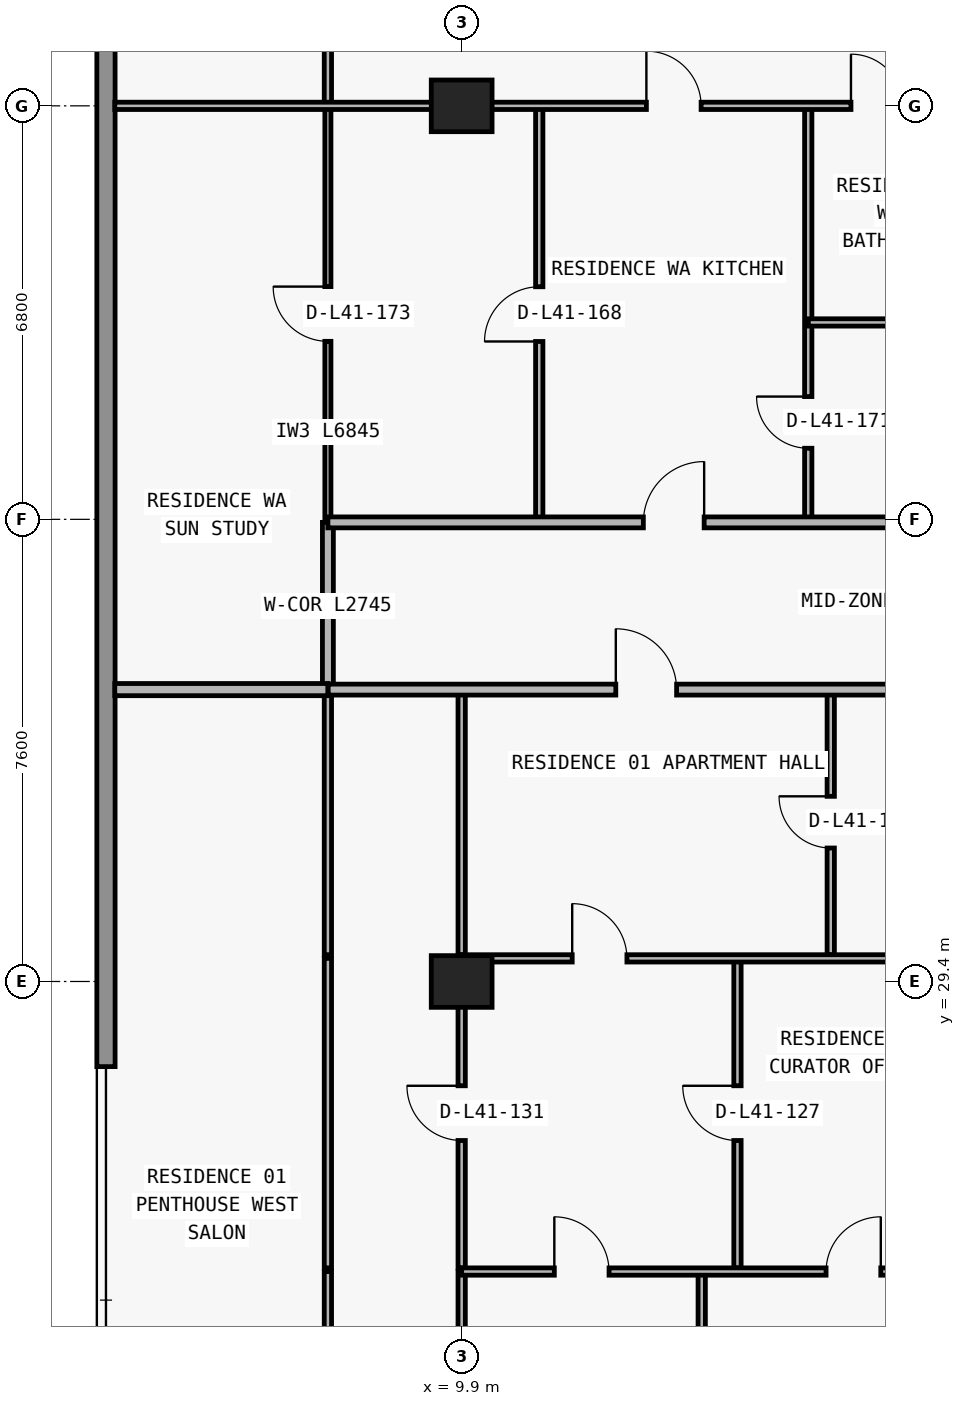
"""IFC4 building model, lengths in metres.
Left out: names, types, materials, properties, quantities, classifications, styles, units other than length and angle.
Written with IfcOpenShell. Run it as: python <this file> out.ifc"""

import sys

from ifc_helpers import new_model, si_unit, direction, frame, frame_2d, origin, origin_2d, place, context, subcontext, project, spatial, rectangle, extrude, element, fill, save


model = new_model("IFC4")
c1 = context("Model", 3, precision=1e-05, world=origin(), true_north=direction((0.0, 1.0)))
c2 = subcontext(c1, "Body", "Model", "MODEL_VIEW")
j1 = project(units=[si_unit("LENGTHUNIT", "METRE"), si_unit("PLANEANGLEUNIT", "RADIAN")], contexts=[c1])
p1 = place(None, origin())
s1 = spatial("IfcSite", under=j1, at=p1, CompositionType="ELEMENT")
p2 = place(p1, origin())
s2 = spatial("IfcBuilding", under=s1, at=p2, CompositionType="ELEMENT")
p3 = place(p2, frame((0.0, 0.0, 148.8)))
s3 = spatial("IfcBuildingStorey", under=s2, at=p3, CompositionType="ELEMENT", Elevation=148.8)
for number, where, z_axis, x_axis in (
    (1, (9.9, 29.4, 0.0), (0.0, 0.0, 1.0), (1.0, 0.0, 0.0)),
    (2, (9.9, 43.8, 0.0), (0.0, 0.0, 1.0), (1.0, 0.0, 0.0)),
):
    element("IfcColumn", number, at=place(p3, frame(where, z_axis=z_axis, x_axis=x_axis)), inside=s3, PredefinedType="COLUMN", context=c2, shape_type="SweptSolid", body=[
        extrude(rectangle(XDim=1.0, YDim=0.85, at=origin_2d()), origin(), (0.0, 0.0, 1.0), 3.0),
    ])
p4 = place(p3, frame((4.05, 28.0, 0.0), z_axis=(0.0, 0.0, 1.0), x_axis=(0.0, 1.0, 0.0)))
e3 = element("IfcWall", 3, at=p4, inside=s3, PredefinedType="STANDARD", context=c2, shape_type="SweptSolid", body=[
    extrude(rectangle(XDim=19.2, YDim=0.3, at=frame_2d((9.6, 0.0))), origin(), (0.0, 0.0, 1.0), 3.0),
])
p5 = place(p3, frame((7.7, 8.885, 0.0), z_axis=(0.0, 0.0, 1.0), x_axis=(0.0, 1.0, 0.0)))
e4 = element("IfcWall", 4, at=p5, inside=s3, PredefinedType="PARTITIONING", context=c2, shape_type="SweptSolid", body=[
    extrude(rectangle(XDim=15.745, YDim=0.12, at=frame_2d((7.873, 0.0))), origin(), (0.0, 0.0, 1.0), 3.0),
])
p6 = place(p5, frame((7.423, 0.0, 0.0)))
e5 = element("IfcOpeningElement", 5, at=p6, cuts=e4, PredefinedType="OPENING", context=c2, shape_type="SweptSolid", body=[
    extrude(rectangle(XDim=0.9, YDim=2.15, at=frame_2d((0.45, 1.075))), frame((0.0, 0.07, 0.0), z_axis=(0.0, -1.0, 0.0), x_axis=(1.0, 0.0, 0.0)), (0.0, 0.0, 1.0), 0.14),
])
p7 = place(p3, frame((7.7, 24.69, 0.0), z_axis=(0.0, 0.0, 1.0), x_axis=(0.0, 1.0, 0.0)))
e6 = element("IfcWall", 6, at=p7, inside=s3, PredefinedType="PARTITIONING", context=c2, shape_type="SweptSolid", body=[
    extrude(rectangle(XDim=5.09, YDim=0.12, at=frame_2d((2.545, 0.0))), origin(), (0.0, 0.0, 1.0), 3.0),
])
p8 = place(p3, frame((7.7, 29.84, 0.0), z_axis=(0.0, 0.0, 1.0), x_axis=(0.0, 1.0, 0.0)))
e7 = element("IfcWall", 7, at=p8, inside=s3, PredefinedType="PARTITIONING", context=c2, shape_type="SweptSolid", body=[
    extrude(rectangle(XDim=4.36, YDim=0.12, at=frame_2d((2.18, 0.0))), origin(), (0.0, 0.0, 1.0), 3.0),
])
p9 = place(p3, frame((7.7, 34.205, 0.0), z_axis=(0.0, 0.0, 1.0), x_axis=(0.0, 1.0, 0.0)))
e8 = element("IfcWall", 8, at=p9, inside=s3, PredefinedType="PARTITIONING", context=c2, shape_type="SweptSolid", body=[
    extrude(rectangle(XDim=2.745, YDim=0.18, at=frame_2d((1.373, 0.0))), origin(), (0.0, 0.0, 1.0), 3.0),
])
p10 = place(p3, frame((7.7, 36.955, 0.0), z_axis=(0.0, 0.0, 1.0), x_axis=(0.0, 1.0, 0.0)))
e9 = element("IfcWall", 9, at=p10, inside=s3, PredefinedType="MOVABLE", context=c2, shape_type="SweptSolid", body=[
    extrude(rectangle(XDim=6.845, YDim=0.1, at=frame_2d((3.422, 0.0))), origin(), (0.0, 0.0, 1.0), 3.0),
])
p11 = place(p10, frame((2.972, 0.0, 0.0)))
e10 = element("IfcOpeningElement", 10, at=p11, cuts=e9, PredefinedType="OPENING", context=c2, shape_type="SweptSolid", body=[
    extrude(rectangle(XDim=0.9, YDim=2.15, at=frame_2d((0.45, 1.075))), frame((0.0, 0.06, 0.0), z_axis=(0.0, -1.0, 0.0), x_axis=(1.0, 0.0, 0.0)), (0.0, 0.0, 1.0), 0.12),
])
p12 = place(p3, frame((7.7, 43.805, 0.0), z_axis=(0.0, 0.0, 1.0), x_axis=(0.0, 1.0, 0.0)))
e11 = element("IfcWall", 11, at=p12, inside=s3, PredefinedType="PARTITIONING", context=c2, shape_type="SweptSolid", body=[
    extrude(rectangle(XDim=3.275, YDim=0.12, at=frame_2d((1.638, 0.0))), origin(), (0.0, 0.0, 1.0), 3.0),
])
p13 = place(p12, frame((1.188, 0.0, 0.0)))
e12 = element("IfcOpeningElement", 12, at=p13, cuts=e11, PredefinedType="OPENING", context=c2, shape_type="SweptSolid", body=[
    extrude(rectangle(XDim=0.9, YDim=2.15, at=frame_2d((0.45, 1.075))), frame((0.0, 0.07, 0.0), z_axis=(0.0, -1.0, 0.0), x_axis=(1.0, 0.0, 0.0)), (0.0, 0.0, 1.0), 0.14),
])
p14 = place(p3, frame((9.9, 8.84, 0.0), z_axis=(0.0, 0.0, 1.0), x_axis=(0.0, 1.0, 0.0)))
e13 = element("IfcWall", 13, at=p14, inside=s3, PredefinedType="PARTITIONING", context=c2, shape_type="SweptSolid", body=[
    extrude(rectangle(XDim=15.79, YDim=0.12, at=frame_2d((7.895, 0.0))), origin(), (0.0, 0.0, 1.0), 2.124),
])
p15 = place(p3, frame((9.9, 24.69, 0.0), z_axis=(0.0, 0.0, 1.0), x_axis=(0.0, 1.0, 0.0)))
e14 = element("IfcWall", 14, at=p15, inside=s3, PredefinedType="PARTITIONING", context=c2, shape_type="SweptSolid", body=[
    extrude(rectangle(XDim=5.09, YDim=0.12, at=frame_2d((2.545, 0.0))), origin(), (0.0, 0.0, 1.0), 2.124),
])
p16 = place(p15, frame((2.095, 0.0, 0.0)))
e15 = element("IfcOpeningElement", 15, at=p16, cuts=e14, PredefinedType="OPENING", context=c2, shape_type="SweptSolid", body=[
    extrude(rectangle(XDim=0.9, YDim=2.074, at=frame_2d((0.45, 1.037))), frame((0.0, 0.07, 0.0), z_axis=(0.0, -1.0, 0.0), x_axis=(1.0, 0.0, 0.0)), (0.0, 0.0, 1.0), 0.14),
])
p17 = place(p3, frame((9.9, 29.84, 0.0), z_axis=(0.0, 0.0, 1.0), x_axis=(0.0, 1.0, 0.0)))
e16 = element("IfcWall", 16, at=p17, inside=s3, PredefinedType="PARTITIONING", context=c2, shape_type="SweptSolid", body=[
    extrude(rectangle(XDim=4.36, YDim=0.12, at=frame_2d((2.18, 0.0))), origin(), (0.0, 0.0, 1.0), 2.124),
])
p18 = place(p3, frame((11.176, 36.95, 0.0), z_axis=(0.0, 0.0, 1.0), x_axis=(0.0, 1.0, 0.0)))
e17 = element("IfcWall", 17, at=p18, inside=s3, PredefinedType="PARTITIONING", context=c2, shape_type="SweptSolid", body=[
    extrude(rectangle(XDim=6.85, YDim=0.12, at=frame_2d((3.425, 0.0))), origin(), (0.0, 0.0, 1.0), 3.0),
])
p19 = place(p18, frame((2.975, 0.0, 0.0)))
e18 = element("IfcOpeningElement", 18, at=p19, cuts=e17, PredefinedType="OPENING", context=c2, shape_type="SweptSolid", body=[
    extrude(rectangle(XDim=0.9, YDim=2.15, at=frame_2d((0.45, 1.075))), frame((0.0, 0.07, 0.0), z_axis=(0.0, -1.0, 0.0), x_axis=(1.0, 0.0, 0.0)), (0.0, 0.0, 1.0), 0.14),
])
p20 = place(p3, frame((13.848, 8.84, 0.0), z_axis=(0.0, 0.0, 1.0), x_axis=(0.0, 1.0, 0.0)))
e19 = element("IfcWall", 19, at=p20, inside=s3, PredefinedType="PARTITIONING", context=c2, shape_type="SweptSolid", body=[
    extrude(rectangle(XDim=15.79, YDim=0.12, at=frame_2d((7.895, 0.0))), origin(), (0.0, 0.0, 1.0), 3.0),
])
p21 = place(p3, frame((14.436, 24.69, 0.0), z_axis=(0.0, 0.0, 1.0), x_axis=(0.0, 1.0, 0.0)))
e20 = element("IfcWall", 20, at=p21, inside=s3, PredefinedType="PARTITIONING", context=c2, shape_type="SweptSolid", body=[
    extrude(rectangle(XDim=5.09, YDim=0.12, at=frame_2d((2.545, 0.0))), origin(), (0.0, 0.0, 1.0), 3.0),
])
p22 = place(p21, frame((2.095, 0.0, 0.0)))
e21 = element("IfcOpeningElement", 21, at=p22, cuts=e20, PredefinedType="OPENING", context=c2, shape_type="SweptSolid", body=[
    extrude(rectangle(XDim=0.9, YDim=2.15, at=frame_2d((0.45, 1.075))), frame((0.0, 0.07, 0.0), z_axis=(0.0, -1.0, 0.0), x_axis=(1.0, 0.0, 0.0)), (0.0, 0.0, 1.0), 0.14),
])
p23 = place(p3, frame((15.6, 36.95, 0.0), z_axis=(0.0, 0.0, 1.0), x_axis=(0.0, 1.0, 0.0)))
e22 = element("IfcWall", 22, at=p23, inside=s3, PredefinedType="PARTITIONING", context=c2, shape_type="SweptSolid", body=[
    extrude(rectangle(XDim=6.85, YDim=0.12, at=frame_2d((3.425, 0.0))), origin(), (0.0, 0.0, 1.0), 3.0),
])
p24 = place(p23, frame((1.219, 0.0, 0.0)))
e23 = element("IfcOpeningElement", 23, at=p24, cuts=e22, PredefinedType="OPENING", context=c2, shape_type="SweptSolid", body=[
    extrude(rectangle(XDim=0.85, YDim=2.1, at=frame_2d((0.425, 1.05))), frame((0.0, 0.07, 0.0), z_axis=(0.0, -1.0, 0.0), x_axis=(1.0, 0.0, 0.0)), (0.0, 0.0, 1.0), 0.14),
])
p25 = place(p3, frame((15.97, 29.84, 0.0), z_axis=(0.0, 0.0, 1.0), x_axis=(0.0, 1.0, 0.0)))
e24 = element("IfcWall", 24, at=p25, inside=s3, PredefinedType="PARTITIONING", context=c2, shape_type="SweptSolid", body=[
    extrude(rectangle(XDim=4.36, YDim=0.12, at=frame_2d((2.18, 0.0))), origin(), (0.0, 0.0, 1.0), 3.0),
])
p26 = place(p25, frame((1.755, 0.0, 0.0)))
e25 = element("IfcOpeningElement", 25, at=p26, cuts=e24, PredefinedType="OPENING", context=c2, shape_type="SweptSolid", body=[
    extrude(rectangle(XDim=0.85, YDim=2.1, at=frame_2d((0.425, 1.05))), frame((0.0, 0.07, 0.0), z_axis=(0.0, -1.0, 0.0), x_axis=(1.0, 0.0, 0.0)), (0.0, 0.0, 1.0), 0.14),
])
p27 = place(p3, frame((9.9, 24.63, 0.0), z_axis=(0.0, 0.0, 1.0), x_axis=(1.0, 0.0, 0.0)))
e26 = element("IfcWall", 26, at=p27, inside=s3, PredefinedType="PARTITIONING", context=c2, shape_type="SweptSolid", body=[
    extrude(rectangle(XDim=8.35, YDim=0.12, at=frame_2d((4.175, 0.0))), origin(), (0.0, 0.0, 1.0), 3.0),
])
p28 = place(p27, frame((1.524, 0.0, 0.0)))
e27 = element("IfcOpeningElement", 27, at=p28, cuts=e26, PredefinedType="OPENING", context=c2, shape_type="SweptSolid", body=[
    extrude(rectangle(XDim=0.9, YDim=2.15, at=frame_2d((0.45, 1.075))), frame((0.0, 0.07, 0.0), z_axis=(0.0, -1.0, 0.0), x_axis=(1.0, 0.0, 0.0)), (0.0, 0.0, 1.0), 0.14),
])
p29 = place(p27, frame((5.993, 0.0, 0.0)))
e28 = element("IfcOpeningElement", 28, at=p29, cuts=e26, PredefinedType="OPENING", context=c2, shape_type="SweptSolid", body=[
    extrude(rectangle(XDim=0.9, YDim=2.15, at=frame_2d((0.45, 1.075))), frame((0.0, 0.07, 0.0), z_axis=(0.0, -1.0, 0.0), x_axis=(1.0, 0.0, 0.0)), (0.0, 0.0, 1.0), 0.14),
])
p30 = place(p3, frame((9.9, 29.78, 0.0), z_axis=(0.0, 0.0, 1.0), x_axis=(1.0, 0.0, 0.0)))
e29 = element("IfcWall", 29, at=p30, inside=s3, PredefinedType="PARTITIONING", context=c2, shape_type="SweptSolid", body=[
    extrude(rectangle(XDim=8.35, YDim=0.12, at=frame_2d((4.175, 0.0))), origin(), (0.0, 0.0, 1.0), 3.0),
])
p31 = place(p30, frame((1.818, 0.0, 0.0)))
e30 = element("IfcOpeningElement", 30, at=p31, cuts=e29, PredefinedType="OPENING", context=c2, shape_type="SweptSolid", body=[
    extrude(rectangle(XDim=0.9, YDim=2.15, at=frame_2d((0.45, 1.075))), frame((0.0, 0.07, 0.0), z_axis=(0.0, -1.0, 0.0), x_axis=(1.0, 0.0, 0.0)), (0.0, 0.0, 1.0), 0.14),
])
p32 = place(p3, frame((4.195, 34.2, 0.0), z_axis=(0.0, 0.0, 1.0), x_axis=(1.0, 0.0, 0.0)))
e31 = element("IfcWall", 31, at=p32, inside=s3, PredefinedType="PARTITIONING", context=c2, shape_type="SweptSolid", body=[
    extrude(rectangle(XDim=3.505, YDim=0.2, at=frame_2d((1.752, 0.0))), origin(), (0.0, 0.0, 1.0), 3.0),
])
p33 = place(p3, frame((7.705, 34.2, 0.0), z_axis=(0.0, 0.0, 1.0), x_axis=(1.0, 0.0, 0.0)))
e32 = element("IfcWall", 32, at=p33, inside=s3, PredefinedType="PARTITIONING", context=c2, shape_type="SweptSolid", body=[
    extrude(rectangle(XDim=10.545, YDim=0.18, at=frame_2d((5.272, 0.0))), origin(), (0.0, 0.0, 1.0), 3.0),
])
p34 = place(p33, frame((4.73, 0.0, 0.0)))
e33 = element("IfcOpeningElement", 33, at=p34, cuts=e32, PredefinedType="OPENING", context=c2, shape_type="SweptSolid", body=[
    extrude(rectangle(XDim=1.0, YDim=2.2, at=frame_2d((0.5, 1.1))), frame((0.0, 0.1, 0.0), z_axis=(0.0, -1.0, 0.0), x_axis=(1.0, 0.0, 0.0)), (0.0, 0.0, 1.0), 0.2),
])
p35 = place(p3, frame((7.7, 36.95, 0.0), z_axis=(0.0, 0.0, 1.0), x_axis=(1.0, 0.0, 0.0)))
e34 = element("IfcWall", 34, at=p35, inside=s3, PredefinedType="PARTITIONING", context=c2, shape_type="SweptSolid", body=[
    extrude(rectangle(XDim=10.145, YDim=0.18, at=frame_2d((5.073, 0.0))), origin(), (0.0, 0.0, 1.0), 3.0),
])
p36 = place(p35, frame((5.188, 0.0, 0.0)))
e35 = element("IfcOpeningElement", 35, at=p36, cuts=e34, PredefinedType="OPENING", context=c2, shape_type="SweptSolid", body=[
    extrude(rectangle(XDim=1.0, YDim=2.2, at=frame_2d((0.5, 1.1))), frame((0.0, 0.1, 0.0), z_axis=(0.0, -1.0, 0.0), x_axis=(1.0, 0.0, 0.0)), (0.0, 0.0, 1.0), 0.2),
])
p37 = place(p3, frame((15.6, 40.238, 0.0), z_axis=(0.0, 0.0, 1.0), x_axis=(1.0, 0.0, 0.0)))
e36 = element("IfcWall", 36, at=p37, inside=s3, PredefinedType="PARTITIONING", context=c2, shape_type="SweptSolid", body=[
    extrude(rectangle(XDim=2.255, YDim=0.12, at=frame_2d((1.127, 0.0))), origin(), (0.0, 0.0, 1.0), 3.0),
])
p38 = place(p3, frame((4.195, 43.8, 0.0), z_axis=(0.0, 0.0, 1.0), x_axis=(1.0, 0.0, 0.0)))
e37 = element("IfcWall", 37, at=p38, inside=s3, PredefinedType="PARTITIONING", context=c2, shape_type="SweptSolid", body=[
    extrude(rectangle(XDim=13.66, YDim=0.12, at=frame_2d((6.83, 0.0))), origin(), (0.0, 0.0, 1.0), 2.289),
])
p39 = place(p38, frame((8.743, 0.0, 0.0)))
e38 = element("IfcOpeningElement", 38, at=p39, cuts=e37, PredefinedType="OPENING", context=c2, shape_type="SweptSolid", body=[
    extrude(rectangle(XDim=0.9, YDim=2.15, at=frame_2d((0.45, 1.075))), frame((0.0, 0.07, 0.0), z_axis=(0.0, -1.0, 0.0), x_axis=(1.0, 0.0, 0.0)), (0.0, 0.0, 1.0), 0.14),
])
p40 = place(p38, frame((12.107, 0.0, 0.0)))
e39 = element("IfcOpeningElement", 39, at=p40, cuts=e37, PredefinedType="OPENING", context=c2, shape_type="SweptSolid", body=[
    extrude(rectangle(XDim=0.85, YDim=2.1, at=frame_2d((0.425, 1.05))), frame((0.0, 0.07, 0.0), z_axis=(0.0, -1.0, 0.0), x_axis=(1.0, 0.0, 0.0)), (0.0, 0.0, 1.0), 0.14),
])
p41 = place(p34, origin())
e40 = element("IfcDoor", 40, at=p41, inside=s3, OperationType="SINGLE_SWING_LEFT", PredefinedType="DOOR", context=c2, shape_type="SweptSolid", body=[
    extrude(rectangle(XDim=1.0, YDim=2.2, at=frame_2d((0.5, 1.1))), frame((0.0, 0.025, 0.0), z_axis=(0.0, -1.0, 0.0), x_axis=(1.0, 0.0, 0.0)), (0.0, 0.0, 1.0), 0.05),
])
fill(e33, e40)
p42 = place(p26, origin())
e41 = element("IfcDoor", 41, at=p42, inside=s3, OperationType="SINGLE_SWING_RIGHT", PredefinedType="DOOR", context=c2, shape_type="SweptSolid", body=[
    extrude(rectangle(XDim=0.85, YDim=2.1, at=frame_2d((0.425, 1.05))), frame((0.0, 0.025, 0.0), z_axis=(0.0, -1.0, 0.0), x_axis=(1.0, 0.0, 0.0)), (0.0, 0.0, 1.0), 0.05),
])
fill(e25, e41)
p43 = place(p31, origin())
e42 = element("IfcDoor", 42, at=p43, inside=s3, OperationType="SINGLE_SWING_LEFT", PredefinedType="DOOR", context=c2, shape_type="SweptSolid", body=[
    extrude(rectangle(XDim=0.9, YDim=2.15, at=frame_2d((0.45, 1.075))), frame((0.0, 0.025, 0.0), z_axis=(0.0, -1.0, 0.0), x_axis=(1.0, 0.0, 0.0)), (0.0, 0.0, 1.0), 0.05),
])
fill(e30, e42)
p44 = place(p22, origin())
e43 = element("IfcDoor", 43, at=p44, inside=s3, OperationType="SINGLE_SWING_RIGHT", PredefinedType="DOOR", context=c2, shape_type="SweptSolid", body=[
    extrude(rectangle(XDim=0.9, YDim=2.15, at=frame_2d((0.45, 1.075))), frame((0.0, 0.025, 0.0), z_axis=(0.0, -1.0, 0.0), x_axis=(1.0, 0.0, 0.0)), (0.0, 0.0, 1.0), 0.05),
])
fill(e21, e43)
p45 = place(p28, origin())
e44 = element("IfcDoor", 44, at=p45, inside=s3, OperationType="SINGLE_SWING_LEFT", PredefinedType="DOOR", context=c2, shape_type="SweptSolid", body=[
    extrude(rectangle(XDim=0.9, YDim=2.15, at=frame_2d((0.45, 1.075))), frame((0.0, 0.025, 0.0), z_axis=(0.0, -1.0, 0.0), x_axis=(1.0, 0.0, 0.0)), (0.0, 0.0, 1.0), 0.05),
])
fill(e27, e44)
p46 = place(p29, origin())
e45 = element("IfcDoor", 45, at=p46, inside=s3, OperationType="SINGLE_SWING_RIGHT", PredefinedType="DOOR", context=c2, shape_type="SweptSolid", body=[
    extrude(rectangle(XDim=0.9, YDim=2.15, at=frame_2d((0.45, 1.075))), frame((0.0, 0.025, 0.0), z_axis=(0.0, -1.0, 0.0), x_axis=(1.0, 0.0, 0.0)), (0.0, 0.0, 1.0), 0.05),
])
fill(e28, e45)
p47 = place(p16, origin())
e46 = element("IfcDoor", 46, at=p47, inside=s3, OperationType="SINGLE_SWING_RIGHT", PredefinedType="DOOR", context=c2, shape_type="SweptSolid", body=[
    extrude(rectangle(XDim=0.9, YDim=2.074, at=frame_2d((0.45, 1.037))), frame((0.0, 0.025, 0.0), z_axis=(0.0, -1.0, 0.0), x_axis=(1.0, 0.0, 0.0)), (0.0, 0.0, 1.0), 0.05),
])
fill(e15, e46)
p48 = place(p19, origin())
e47 = element("IfcDoor", 47, at=p48, inside=s3, OperationType="SINGLE_SWING_LEFT", PredefinedType="DOOR", context=c2, shape_type="SweptSolid", body=[
    extrude(rectangle(XDim=0.9, YDim=2.15, at=frame_2d((0.45, 1.075))), frame((0.0, 0.025, 0.0), z_axis=(0.0, -1.0, 0.0), x_axis=(1.0, 0.0, 0.0)), (0.0, 0.0, 1.0), 0.05),
])
fill(e18, e47)
p49 = place(p36, origin())
e48 = element("IfcDoor", 48, at=p49, inside=s3, OperationType="SINGLE_SWING_RIGHT", PredefinedType="DOOR", context=c2, shape_type="SweptSolid", body=[
    extrude(rectangle(XDim=1.0, YDim=2.2, at=frame_2d((0.5, 1.1))), frame((0.0, 0.025, 0.0), z_axis=(0.0, -1.0, 0.0), x_axis=(1.0, 0.0, 0.0)), (0.0, 0.0, 1.0), 0.05),
])
fill(e35, e48)
p50 = place(p39, origin())
e49 = element("IfcDoor", 49, at=p50, inside=s3, OperationType="SINGLE_SWING_LEFT", PredefinedType="DOOR", context=c2, shape_type="SweptSolid", body=[
    extrude(rectangle(XDim=0.9, YDim=2.15, at=frame_2d((0.45, 1.075))), frame((0.0, 0.025, 0.0), z_axis=(0.0, -1.0, 0.0), x_axis=(1.0, 0.0, 0.0)), (0.0, 0.0, 1.0), 0.05),
])
fill(e38, e49)
p51 = place(p24, origin())
e50 = element("IfcDoor", 50, at=p51, inside=s3, OperationType="SINGLE_SWING_RIGHT", PredefinedType="DOOR", context=c2, shape_type="SweptSolid", body=[
    extrude(rectangle(XDim=0.85, YDim=2.1, at=frame_2d((0.425, 1.05))), frame((0.0, 0.025, 0.0), z_axis=(0.0, -1.0, 0.0), x_axis=(1.0, 0.0, 0.0)), (0.0, 0.0, 1.0), 0.05),
])
fill(e23, e50)
p52 = place(p40, origin())
e51 = element("IfcDoor", 51, at=p52, inside=s3, OperationType="SINGLE_SWING_LEFT", PredefinedType="DOOR", context=c2, shape_type="SweptSolid", body=[
    extrude(rectangle(XDim=0.85, YDim=2.1, at=frame_2d((0.425, 1.05))), frame((0.0, 0.025, 0.0), z_axis=(0.0, -1.0, 0.0), x_axis=(1.0, 0.0, 0.0)), (0.0, 0.0, 1.0), 0.05),
])
fill(e39, e51)
p53 = place(p11, origin())
e52 = element("IfcDoor", 52, at=p53, inside=s3, OperationType="SINGLE_SWING_RIGHT", PredefinedType="DOOR", context=c2, shape_type="SweptSolid", body=[
    extrude(rectangle(XDim=0.9, YDim=2.15, at=frame_2d((0.45, 1.075))), frame((0.0, 0.025, 0.0), z_axis=(0.0, -1.0, 0.0), x_axis=(1.0, 0.0, 0.0)), (0.0, 0.0, 1.0), 0.05),
])
fill(e10, e52)
save(model, sys.argv[1])
